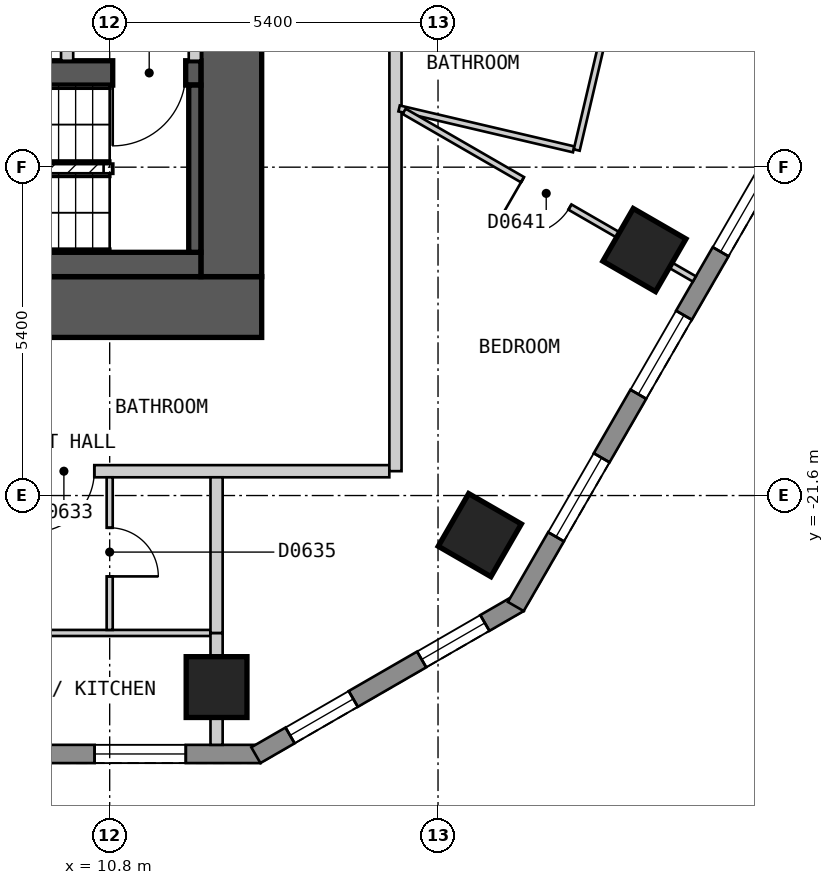
"""IFC4 building model, lengths in metres.
Left out: names, types, materials, properties, quantities, classifications, styles, units other than length and angle.
Written with IfcOpenShell. Run it as: python <this file> out.ifc"""

import sys

from ifc_helpers import new_model, si_unit, direction, frame, frame_2d, origin, origin_2d, place, context, subcontext, project, spatial, polyline, rectangle, outline, extrude, element, fill, save


model = new_model("IFC4")
c1 = context("Model", 3, precision=1e-05, world=origin(), true_north=direction((0.0, 1.0)))
c2 = subcontext(c1, "Body", "Model", "MODEL_VIEW")
j1 = project(units=[si_unit("LENGTHUNIT", "METRE"), si_unit("PLANEANGLEUNIT", "RADIAN")], contexts=[c1])
p1 = place(None, origin())
s1 = spatial("IfcSite", under=j1, at=p1, CompositionType="ELEMENT")
p2 = place(p1, origin())
s2 = spatial("IfcBuilding", under=s1, at=p2, CompositionType="ELEMENT")
p3 = place(p2, frame((0.0, 0.0, 81.0)))
s3 = spatial("IfcBuildingStorey", under=s2, at=p3, CompositionType="ELEMENT", Elevation=81.0)
for number, where, z_axis, x_axis in (
    (1, (12.558, -24.75, 0.0), (0.0, 0.0, 1.0), (1.0, 0.0, 0.0)),
    (2, (16.887, -22.251, 0.0), (0.0, 0.0, 1.0), (0.5, 0.866, 0.0)),
    (3, (19.594, -17.563, 0.0), (0.0, 0.0, 1.0), (0.5, 0.866, 0.0)),
):
    element("IfcColumn", number, at=place(p3, frame(where, z_axis=z_axis, x_axis=x_axis)), inside=s3, PredefinedType="COLUMN", context=c2, shape_type="SweptSolid", body=[
        extrude(rectangle(XDim=1.0, YDim=1.0, at=origin_2d()), origin(), (0.0, 0.0, 1.0), 3.0),
    ])
p4 = place(p3, frame((-13.3, -18.5, 0.0), z_axis=(0.0, 0.0, 1.0), x_axis=(1.0, 0.0, 0.0)))
e4 = element("IfcWall", 4, at=p4, inside=s3, PredefinedType="SHEAR", context=c2, shape_type="SweptSolid", body=[
    extrude(rectangle(XDim=26.6, YDim=1.0, at=frame_2d((13.3, 0.0))), origin(), (0.0, 0.0, 1.0), 2.7),
])
p5 = place(p3, frame((12.8, -18.0, 0.0), z_axis=(0.0, 0.0, 1.0), x_axis=(0.0, 1.0, 0.0)))
e5 = element("IfcWall", 5, at=p5, inside=s3, PredefinedType="SHEAR", context=c2, shape_type="SweptSolid", body=[
    extrude(rectangle(XDim=12.0, YDim=1.0, at=frame_2d((6.0, 0.0))), origin(), (0.0, 0.0, 1.0), 2.7),
])
p6 = place(p3, frame((-12.3, -14.65, 0.0), z_axis=(0.0, 0.0, 1.0), x_axis=(1.0, 0.0, 0.0)))
e6 = element("IfcWall", 6, at=p6, inside=s3, PredefinedType="SHEAR", context=c2, shape_type="SweptSolid", body=[
    extrude(rectangle(XDim=24.6, YDim=0.4, at=frame_2d((12.3, 0.0))), origin(), (0.0, 0.0, 1.0), 2.7),
])
p7 = place(p6, frame((1.5, 0.0, 0.0), z_axis=(0.0, 0.0, 1.0), x_axis=(-1.0, 0.0, 0.0)))
e7 = element("IfcOpeningElement", 7, at=p7, cuts=e6, PredefinedType="OPENING", context=c2, shape_type="SweptSolid", body=[
    extrude(rectangle(XDim=1.2, YDim=2.1, at=frame_2d((0.6, 1.05))), frame((0.0, 0.21, 0.0), z_axis=(0.0, -1.0, 0.0), x_axis=(1.0, 0.0, 0.0)), (0.0, 0.0, 1.0), 0.42),
])
p8 = place(p6, frame((24.35, 0.0, 0.0), z_axis=(0.0, 0.0, 1.0), x_axis=(-1.0, 0.0, 0.0)))
e8 = element("IfcOpeningElement", 8, at=p8, cuts=e6, PredefinedType="OPENING", context=c2, shape_type="SweptSolid", body=[
    extrude(rectangle(XDim=1.2, YDim=2.1, at=frame_2d((0.6, 1.05))), frame((0.0, 0.21, 0.0), z_axis=(0.0, -1.0, 0.0), x_axis=(1.0, 0.0, 0.0)), (0.0, 0.0, 1.0), 0.42),
])
p9 = place(p6, frame((16.45, 0.0, 0.0), z_axis=(0.0, 0.0, 1.0), x_axis=(-1.0, 0.0, 0.0)))
e9 = element("IfcOpeningElement", 9, at=p9, cuts=e6, PredefinedType="OPENING", context=c2, shape_type="SweptSolid", body=[
    extrude(rectangle(XDim=0.9, YDim=2.1, at=frame_2d((0.45, 1.05))), frame((0.0, 0.21, 0.0), z_axis=(0.0, -1.0, 0.0), x_axis=(1.0, 0.0, 0.0)), (0.0, 0.0, 1.0), 0.42),
])
p10 = place(p6, frame((18.25, 0.0, 0.0), z_axis=(0.0, 0.0, 1.0), x_axis=(-1.0, 0.0, 0.0)))
e10 = element("IfcOpeningElement", 10, at=p10, cuts=e6, PredefinedType="OPENING", context=c2, shape_type="SweptSolid", body=[
    extrude(rectangle(XDim=0.9, YDim=2.1, at=frame_2d((0.45, 1.05))), frame((0.0, 0.21, 0.0), z_axis=(0.0, -1.0, 0.0), x_axis=(1.0, 0.0, 0.0)), (0.0, 0.0, 1.0), 0.42),
])
p11 = place(p3, frame((-13.279, -25.85, 0.0), z_axis=(0.0, 0.0, 1.0), x_axis=(1.0, 0.0, 0.0)))
e11 = element("IfcWall", 11, at=p11, inside=s3, PredefinedType="SOLIDWALL", context=c2, shape_type="SweptSolid", body=[
    extrude(outline(polyline([(0.0, -0.15), (26.558, -0.15), (26.478, 0.15), (0.08, 0.15), (0.0, -0.15)])), origin(), (0.0, 0.0, 1.0), 2.7),
])
p12 = place(p11, frame((1.228, 0.0, 0.15)))
e12 = element("IfcOpeningElement", 12, at=p12, cuts=e11, PredefinedType="OPENING", context=c2, shape_type="SweptSolid", body=[
    extrude(rectangle(XDim=1.5, YDim=2.1, at=frame_2d((0.75, 1.05))), frame((0.0, 0.16, 0.0), z_axis=(0.0, -1.0, 0.0), x_axis=(1.0, 0.0, 0.0)), (0.0, 0.0, 1.0), 0.32),
])
p13 = place(p11, frame((3.739, 0.0, 0.15)))
e13 = element("IfcOpeningElement", 13, at=p13, cuts=e11, PredefinedType="OPENING", context=c2, shape_type="SweptSolid", body=[
    extrude(rectangle(XDim=1.5, YDim=2.1, at=frame_2d((0.75, 1.05))), frame((0.0, 0.16, 0.0), z_axis=(0.0, -1.0, 0.0), x_axis=(1.0, 0.0, 0.0)), (0.0, 0.0, 1.0), 0.32),
])
p14 = place(p11, frame((6.251, 0.0, 0.15)))
e14 = element("IfcOpeningElement", 14, at=p14, cuts=e11, PredefinedType="OPENING", context=c2, shape_type="SweptSolid", body=[
    extrude(rectangle(XDim=1.5, YDim=2.1, at=frame_2d((0.75, 1.05))), frame((0.0, 0.16, 0.0), z_axis=(0.0, -1.0, 0.0), x_axis=(1.0, 0.0, 0.0)), (0.0, 0.0, 1.0), 0.32),
])
p15 = place(p11, frame((8.762, 0.0, 0.15)))
e15 = element("IfcOpeningElement", 15, at=p15, cuts=e11, PredefinedType="OPENING", context=c2, shape_type="SweptSolid", body=[
    extrude(rectangle(XDim=1.5, YDim=2.1, at=frame_2d((0.75, 1.05))), frame((0.0, 0.16, 0.0), z_axis=(0.0, -1.0, 0.0), x_axis=(1.0, 0.0, 0.0)), (0.0, 0.0, 1.0), 0.32),
])
p16 = place(p11, frame((11.274, 0.0, 0.15)))
e16 = element("IfcOpeningElement", 16, at=p16, cuts=e11, PredefinedType="OPENING", context=c2, shape_type="SweptSolid", body=[
    extrude(rectangle(XDim=1.5, YDim=2.1, at=frame_2d((0.75, 1.05))), frame((0.0, 0.16, 0.0), z_axis=(0.0, -1.0, 0.0), x_axis=(1.0, 0.0, 0.0)), (0.0, 0.0, 1.0), 0.32),
])
p17 = place(p11, frame((13.785, 0.0, 0.15)))
e17 = element("IfcOpeningElement", 17, at=p17, cuts=e11, PredefinedType="OPENING", context=c2, shape_type="SweptSolid", body=[
    extrude(rectangle(XDim=1.5, YDim=2.1, at=frame_2d((0.75, 1.05))), frame((0.0, 0.16, 0.0), z_axis=(0.0, -1.0, 0.0), x_axis=(1.0, 0.0, 0.0)), (0.0, 0.0, 1.0), 0.32),
])
p18 = place(p11, frame((16.297, 0.0, 0.15)))
e18 = element("IfcOpeningElement", 18, at=p18, cuts=e11, PredefinedType="OPENING", context=c2, shape_type="SweptSolid", body=[
    extrude(rectangle(XDim=1.5, YDim=2.1, at=frame_2d((0.75, 1.05))), frame((0.0, 0.16, 0.0), z_axis=(0.0, -1.0, 0.0), x_axis=(1.0, 0.0, 0.0)), (0.0, 0.0, 1.0), 0.32),
])
p19 = place(p11, frame((18.808, 0.0, 0.15)))
e19 = element("IfcOpeningElement", 19, at=p19, cuts=e11, PredefinedType="OPENING", context=c2, shape_type="SweptSolid", body=[
    extrude(rectangle(XDim=1.5, YDim=2.1, at=frame_2d((0.75, 1.05))), frame((0.0, 0.16, 0.0), z_axis=(0.0, -1.0, 0.0), x_axis=(1.0, 0.0, 0.0)), (0.0, 0.0, 1.0), 0.32),
])
p20 = place(p11, frame((21.32, 0.0, 0.15)))
e20 = element("IfcOpeningElement", 20, at=p20, cuts=e11, PredefinedType="OPENING", context=c2, shape_type="SweptSolid", body=[
    extrude(rectangle(XDim=1.5, YDim=2.1, at=frame_2d((0.75, 1.05))), frame((0.0, 0.16, 0.0), z_axis=(0.0, -1.0, 0.0), x_axis=(1.0, 0.0, 0.0)), (0.0, 0.0, 1.0), 0.32),
])
p21 = place(p11, frame((23.831, 0.0, 0.15)))
e21 = element("IfcOpeningElement", 21, at=p21, cuts=e11, PredefinedType="OPENING", context=c2, shape_type="SweptSolid", body=[
    extrude(rectangle(XDim=1.5, YDim=2.1, at=frame_2d((0.75, 1.05))), frame((0.0, 0.16, 0.0), z_axis=(0.0, -1.0, 0.0), x_axis=(1.0, 0.0, 0.0)), (0.0, 0.0, 1.0), 0.32),
])
p22 = place(p3, frame((13.204, -25.87, 0.0), z_axis=(0.0, 0.0, 1.0), x_axis=(0.866010750942, 0.50002537861, 0.0)))
e22 = element("IfcWall", 22, at=p22, inside=s3, PredefinedType="SOLIDWALL", context=c2, shape_type="SweptSolid", body=[
    extrude(outline(polyline([(0.0, -0.15), (5.0, -0.15), (4.919, 0.15), (0.08, 0.15), (0.0, -0.15)])), origin(), (0.0, 0.0, 1.0), 2.7),
])
p23 = place(p22, frame((0.65, 0.0, 0.15)))
e23 = element("IfcOpeningElement", 23, at=p23, cuts=e22, PredefinedType="OPENING", context=c2, shape_type="SweptSolid", body=[
    extrude(rectangle(XDim=1.2, YDim=2.1, at=frame_2d((0.6, 1.05))), frame((0.0, 0.16, 0.0), z_axis=(0.0, -1.0, 0.0), x_axis=(1.0, 0.0, 0.0)), (0.0, 0.0, 1.0), 0.32),
])
p24 = place(p22, frame((3.149, 0.0, 0.15)))
e24 = element("IfcOpeningElement", 24, at=p24, cuts=e22, PredefinedType="OPENING", context=c2, shape_type="SweptSolid", body=[
    extrude(rectangle(XDim=1.2, YDim=2.1, at=frame_2d((0.6, 1.05))), frame((0.0, 0.16, 0.0), z_axis=(0.0, -1.0, 0.0), x_axis=(1.0, 0.0, 0.0)), (0.0, 0.0, 1.0), 0.32),
])
p25 = place(p3, frame((17.479, -23.425, 0.0), z_axis=(0.0, 0.0, 1.0), x_axis=(0.500035407905, 0.866004960056, 0.0)))
e25 = element("IfcWall", 25, at=p25, inside=s3, PredefinedType="SOLIDWALL", context=c2, shape_type="SweptSolid", body=[
    extrude(outline(polyline([(0.0, -0.15), (23.094, -0.15), (23.014, 0.15), (0.08, 0.15), (0.0, -0.15)])), origin(), (0.0, 0.0, 1.0), 2.7),
])
p26 = place(p25, frame((1.324, 0.0, 0.15)))
e26 = element("IfcOpeningElement", 26, at=p26, cuts=e25, PredefinedType="OPENING", context=c2, shape_type="SweptSolid", body=[
    extrude(rectangle(XDim=1.5, YDim=2.1, at=frame_2d((0.75, 1.05))), frame((0.0, 0.16, 0.0), z_axis=(0.0, -1.0, 0.0), x_axis=(1.0, 0.0, 0.0)), (0.0, 0.0, 1.0), 0.32),
])
p27 = place(p25, frame((4.031, 0.0, 0.15)))
e27 = element("IfcOpeningElement", 27, at=p27, cuts=e25, PredefinedType="OPENING", context=c2, shape_type="SweptSolid", body=[
    extrude(rectangle(XDim=1.5, YDim=2.1, at=frame_2d((0.75, 1.05))), frame((0.0, 0.16, 0.0), z_axis=(0.0, -1.0, 0.0), x_axis=(1.0, 0.0, 0.0)), (0.0, 0.0, 1.0), 0.32),
])
p28 = place(p25, frame((6.737, 0.0, 0.15)))
e28 = element("IfcOpeningElement", 28, at=p28, cuts=e25, PredefinedType="OPENING", context=c2, shape_type="SweptSolid", body=[
    extrude(rectangle(XDim=1.5, YDim=2.1, at=frame_2d((0.75, 1.05))), frame((0.0, 0.16, 0.0), z_axis=(0.0, -1.0, 0.0), x_axis=(1.0, 0.0, 0.0)), (0.0, 0.0, 1.0), 0.32),
])
p29 = place(p25, frame((9.444, 0.0, 0.15)))
e29 = element("IfcOpeningElement", 29, at=p29, cuts=e25, PredefinedType="OPENING", context=c2, shape_type="SweptSolid", body=[
    extrude(rectangle(XDim=1.5, YDim=2.1, at=frame_2d((0.75, 1.05))), frame((0.0, 0.16, 0.0), z_axis=(0.0, -1.0, 0.0), x_axis=(1.0, 0.0, 0.0)), (0.0, 0.0, 1.0), 0.32),
])
p30 = place(p25, frame((12.151, 0.0, 0.15)))
e30 = element("IfcOpeningElement", 30, at=p30, cuts=e25, PredefinedType="OPENING", context=c2, shape_type="SweptSolid", body=[
    extrude(rectangle(XDim=1.5, YDim=2.1, at=frame_2d((0.75, 1.05))), frame((0.0, 0.16, 0.0), z_axis=(0.0, -1.0, 0.0), x_axis=(1.0, 0.0, 0.0)), (0.0, 0.0, 1.0), 0.32),
])
p31 = place(p25, frame((14.857, 0.0, 0.15)))
e31 = element("IfcOpeningElement", 31, at=p31, cuts=e25, PredefinedType="OPENING", context=c2, shape_type="SweptSolid", body=[
    extrude(rectangle(XDim=1.5, YDim=2.1, at=frame_2d((0.75, 1.05))), frame((0.0, 0.16, 0.0), z_axis=(0.0, -1.0, 0.0), x_axis=(1.0, 0.0, 0.0)), (0.0, 0.0, 1.0), 0.32),
])
p32 = place(p25, frame((17.564, 0.0, 0.15)))
e32 = element("IfcOpeningElement", 32, at=p32, cuts=e25, PredefinedType="OPENING", context=c2, shape_type="SweptSolid", body=[
    extrude(rectangle(XDim=1.5, YDim=2.1, at=frame_2d((0.75, 1.05))), frame((0.0, 0.16, 0.0), z_axis=(0.0, -1.0, 0.0), x_axis=(1.0, 0.0, 0.0)), (0.0, 0.0, 1.0), 0.32),
])
p33 = place(p25, frame((20.271, 0.0, 0.15)))
e33 = element("IfcOpeningElement", 33, at=p33, cuts=e25, PredefinedType="OPENING", context=c2, shape_type="SweptSolid", body=[
    extrude(rectangle(XDim=1.5, YDim=2.1, at=frame_2d((0.75, 1.05))), frame((0.0, 0.16, 0.0), z_axis=(0.0, -1.0, 0.0), x_axis=(1.0, 0.0, 0.0)), (0.0, 0.0, 1.0), 0.32),
])
p34 = place(p3, frame((-15.499, -21.2, 0.0), z_axis=(0.0, 0.0, 1.0), x_axis=(1.0, 0.0, 0.0)))
e34 = element("IfcWall", 34, at=p34, inside=s3, PredefinedType="PARTITIONING", context=c2, shape_type="SweptSolid", body=[
    extrude(rectangle(XDim=30.898, YDim=0.2, at=frame_2d((15.449, 0.0))), origin(), (0.0, 0.0, 1.0), 2.7),
])
p35 = place(p34, frame((4.954, 0.0, 0.0)))
e35 = element("IfcOpeningElement", 35, at=p35, cuts=e34, PredefinedType="OPENING", context=c2, shape_type="SweptSolid", body=[
    extrude(rectangle(XDim=1.0, YDim=2.1, at=frame_2d((0.5, 1.05))), frame((0.0, 0.11, 0.0), z_axis=(0.0, -1.0, 0.0), x_axis=(1.0, 0.0, 0.0)), (0.0, 0.0, 1.0), 0.22),
])
p36 = place(p34, frame((25.046, 0.0, 0.0)))
e36 = element("IfcOpeningElement", 36, at=p36, cuts=e34, PredefinedType="OPENING", context=c2, shape_type="SweptSolid", body=[
    extrude(rectangle(XDim=1.0, YDim=2.1, at=frame_2d((0.5, 1.05))), frame((0.0, 0.11, 0.0), z_axis=(0.0, -1.0, 0.0), x_axis=(1.0, 0.0, 0.0)), (0.0, 0.0, 1.0), 0.22),
])
p37 = place(p3, frame((15.5, -21.199, 0.0), z_axis=(0.0, 0.0, 1.0), x_axis=(0.0, 1.0, 0.0)))
e37 = element("IfcWall", 37, at=p37, inside=s3, PredefinedType="PARTITIONING", context=c2, shape_type="SweptSolid", body=[
    extrude(rectangle(XDim=10.483, YDim=0.2, at=frame_2d((5.241, 0.0))), origin(), (0.0, 0.0, 1.0), 2.7),
])
p38 = place(p37, frame((8.376, 0.0, 0.0)))
e38 = element("IfcOpeningElement", 38, at=p38, cuts=e37, PredefinedType="OPENING", context=c2, shape_type="SweptSolid", body=[
    extrude(rectangle(XDim=1.0, YDim=2.1, at=frame_2d((0.5, 1.05))), frame((0.0, 0.11, 0.0), z_axis=(0.0, -1.0, 0.0), x_axis=(1.0, 0.0, 0.0)), (0.0, 0.0, 1.0), 0.22),
])
p39 = place(p3, frame((15.56, -15.234, 0.0), z_axis=(0.0, 0.0, 1.0), x_axis=(0.973598200068, -0.228268580457, 0.0)))
e39 = element("IfcWall", 39, at=p39, inside=s3, PredefinedType="PARTITIONING", context=c2, shape_type="SweptSolid", body=[
    extrude(rectangle(XDim=2.949, YDim=0.1, at=frame_2d((1.474, 0.0))), origin(), (0.0, 0.0, 1.0), 2.7),
])
p40 = place(p3, frame((15.643, -15.282, 0.0), z_axis=(0.0, 0.0, 1.0), x_axis=(0.865990833325, -0.500059873013, 0.0)))
e40 = element("IfcWall", 40, at=p40, inside=s3, PredefinedType="PARTITIONING", context=c2, shape_type="SweptSolid", body=[
    extrude(rectangle(XDim=5.511, YDim=0.1, at=frame_2d((2.756, 0.0))), origin(), (0.0, 0.0, 1.0), 2.7),
])
p41 = place(p40, frame((2.248, 0.0, 0.0)))
e41 = element("IfcOpeningElement", 41, at=p41, cuts=e40, PredefinedType="OPENING", context=c2, shape_type="SweptSolid", body=[
    extrude(rectangle(XDim=0.9, YDim=2.1, at=frame_2d((0.45, 1.05))), frame((0.0, 0.06, 0.0), z_axis=(0.0, -1.0, 0.0), x_axis=(1.0, 0.0, 0.0)), (0.0, 0.0, 1.0), 0.12),
])
p42 = place(p3, frame((9.294, -23.86, 0.0), z_axis=(0.0, 0.0, 1.0), x_axis=(1.0, 0.0, 0.0)))
e42 = element("IfcWall", 42, at=p42, inside=s3, PredefinedType="PARTITIONING", context=c2, shape_type="SweptSolid", body=[
    extrude(rectangle(XDim=3.164, YDim=0.1, at=frame_2d((1.582, 0.0))), origin(), (0.0, 0.0, 1.0), 2.7),
])
p43 = place(p3, frame((18.481, -15.918, 0.0), z_axis=(0.0, 0.0, 1.0), x_axis=(0.228391116115, 0.97356946238, 0.0)))
e43 = element("IfcWall", 43, at=p43, inside=s3, PredefinedType="PARTITIONING", context=c2, shape_type="SweptSolid", body=[
    extrude(rectangle(XDim=3.674, YDim=0.1, at=frame_2d((1.837, 0.0))), origin(), (0.0, 0.0, 1.0), 2.7),
])
p44 = place(p3, frame((10.8, -23.81, 0.0), z_axis=(0.0, 0.0, 1.0), x_axis=(0.0, 1.0, 0.0)))
e44 = element("IfcWall", 44, at=p44, inside=s3, PredefinedType="PARTITIONING", context=c2, shape_type="SweptSolid", body=[
    extrude(rectangle(XDim=2.51, YDim=0.1, at=frame_2d((1.255, 0.0))), origin(), (0.0, 0.0, 1.0), 2.7),
])
p45 = place(p44, frame((0.88, 0.0, 0.0)))
e45 = element("IfcOpeningElement", 45, at=p45, cuts=e44, PredefinedType="OPENING", context=c2, shape_type="SweptSolid", body=[
    extrude(rectangle(XDim=0.8, YDim=2.1, at=frame_2d((0.4, 1.05))), frame((0.0, 0.06, 0.0), z_axis=(0.0, -1.0, 0.0), x_axis=(1.0, 0.0, 0.0)), (0.0, 0.0, 1.0), 0.12),
])
p46 = place(p3, frame((12.558, -23.86, 0.0), z_axis=(0.0, 0.0, 1.0), x_axis=(0.0, -1.0, 0.0)))
e46 = element("IfcWall", 46, at=p46, inside=s3, PredefinedType="PARTITIONING", context=c2, shape_type="SweptSolid", body=[
    extrude(rectangle(XDim=1.84, YDim=0.2, at=frame_2d((0.92, 0.0))), origin(), (0.0, 0.0, 1.0), 2.7),
])
p47 = place(p3, frame((12.558, -23.86, 0.0), z_axis=(0.0, 0.0, 1.0), x_axis=(0.0, 1.0, 0.0)))
e47 = element("IfcWall", 47, at=p47, inside=s3, PredefinedType="PARTITIONING", context=c2, shape_type="SweptSolid", body=[
    extrude(rectangle(XDim=2.56, YDim=0.2, at=frame_2d((1.28, 0.0))), origin(), (0.0, 0.0, 1.0), 2.7),
])
p48 = place(p3, frame((6.7, -17.8, 0.0), z_axis=(0.0, 0.0, 1.0), x_axis=(1.0, 0.0, 0.0)))
e48 = element("IfcWall", 48, at=p48, inside=s3, PredefinedType="SOLIDWALL", context=c2, shape_type="SweptSolid", body=[
    extrude(rectangle(XDim=5.6, YDim=0.4, at=frame_2d((2.8, 0.0))), origin(), (0.0, 0.0, 1.0), 2.7),
])
p49 = place(p3, frame((10.1, -14.45, 0.0), z_axis=(0.0, 0.0, 1.0), x_axis=(0.0, 1.0, 0.0)))
e49 = element("IfcWall", 49, at=p49, inside=s3, PredefinedType="PARTITIONING", context=c2, shape_type="SweptSolid", body=[
    extrude(rectangle(XDim=1.8, YDim=0.2, at=frame_2d((0.9, 0.0))), origin(), (0.0, 0.0, 1.0), 2.7),
])
p50 = place(p3, frame((12.2, -17.6, 0.0), z_axis=(0.0, 0.0, 1.0), x_axis=(0.0, 1.0, 0.0)))
e50 = element("IfcWall", 50, at=p50, inside=s3, PredefinedType="SOLIDWALL", context=c2, shape_type="SweptSolid", body=[
    extrude(rectangle(XDim=2.75, YDim=0.2, at=frame_2d((1.375, 0.0))), origin(), (0.0, 0.0, 1.0), 2.7),
])
p51 = place(p3, frame((12.2, -14.45, 0.0), z_axis=(0.0, 0.0, 1.0), x_axis=(0.0, 1.0, 0.0)))
e51 = element("IfcWall", 51, at=p51, inside=s3, PredefinedType="PARTITIONING", context=c2, shape_type="SweptSolid", body=[
    extrude(rectangle(XDim=8.25, YDim=0.2, at=frame_2d((4.125, 0.0))), origin(), (0.0, 0.0, 1.0), 2.7),
])
p52 = place(p21, origin())
e52 = element("IfcWindow", 52, at=p52, inside=s3, PartitioningType="SINGLE_PANEL", PredefinedType="WINDOW", context=c2, shape_type="SweptSolid", body=[
    extrude(rectangle(XDim=1.5, YDim=2.1, at=frame_2d((0.75, 1.05))), frame((0.0, 0.03, 0.0), z_axis=(0.0, -1.0, 0.0), x_axis=(1.0, 0.0, 0.0)), (0.0, 0.0, 1.0), 0.06),
])
fill(e21, e52)
p53 = place(p23, origin())
e53 = element("IfcWindow", 53, at=p53, inside=s3, PartitioningType="SINGLE_PANEL", PredefinedType="WINDOW", context=c2, shape_type="SweptSolid", body=[
    extrude(rectangle(XDim=1.2, YDim=2.1, at=frame_2d((0.6, 1.05))), frame((0.0, 0.03, 0.0), z_axis=(0.0, -1.0, 0.0), x_axis=(1.0, 0.0, 0.0)), (0.0, 0.0, 1.0), 0.06),
])
fill(e23, e53)
p54 = place(p24, origin())
e54 = element("IfcWindow", 54, at=p54, inside=s3, PartitioningType="SINGLE_PANEL", PredefinedType="WINDOW", context=c2, shape_type="SweptSolid", body=[
    extrude(rectangle(XDim=1.2, YDim=2.1, at=frame_2d((0.6, 1.05))), frame((0.0, 0.03, 0.0), z_axis=(0.0, -1.0, 0.0), x_axis=(1.0, 0.0, 0.0)), (0.0, 0.0, 1.0), 0.06),
])
fill(e24, e54)
p55 = place(p26, origin())
e55 = element("IfcWindow", 55, at=p55, inside=s3, PartitioningType="SINGLE_PANEL", PredefinedType="WINDOW", context=c2, shape_type="SweptSolid", body=[
    extrude(rectangle(XDim=1.5, YDim=2.1, at=frame_2d((0.75, 1.05))), frame((0.0, 0.03, 0.0), z_axis=(0.0, -1.0, 0.0), x_axis=(1.0, 0.0, 0.0)), (0.0, 0.0, 1.0), 0.06),
])
fill(e26, e55)
p56 = place(p27, origin())
e56 = element("IfcWindow", 56, at=p56, inside=s3, PartitioningType="SINGLE_PANEL", PredefinedType="WINDOW", context=c2, shape_type="SweptSolid", body=[
    extrude(rectangle(XDim=1.5, YDim=2.1, at=frame_2d((0.75, 1.05))), frame((0.0, 0.03, 0.0), z_axis=(0.0, -1.0, 0.0), x_axis=(1.0, 0.0, 0.0)), (0.0, 0.0, 1.0), 0.06),
])
fill(e27, e56)
p57 = place(p28, origin())
e57 = element("IfcWindow", 57, at=p57, inside=s3, PartitioningType="SINGLE_PANEL", PredefinedType="WINDOW", context=c2, shape_type="SweptSolid", body=[
    extrude(rectangle(XDim=1.5, YDim=2.1, at=frame_2d((0.75, 1.05))), frame((0.0, 0.03, 0.0), z_axis=(0.0, -1.0, 0.0), x_axis=(1.0, 0.0, 0.0)), (0.0, 0.0, 1.0), 0.06),
])
fill(e28, e57)
p58 = place(p36, origin())
e58 = element("IfcDoor", 58, at=p58, inside=s3, OperationType="SINGLE_SWING_LEFT", PredefinedType="DOOR", context=c2, shape_type="SweptSolid", body=[
    extrude(rectangle(XDim=1.0, YDim=2.1, at=frame_2d((0.5, 1.05))), frame((0.0, 0.025, 0.0), z_axis=(0.0, -1.0, 0.0), x_axis=(1.0, 0.0, 0.0)), (0.0, 0.0, 1.0), 0.05),
])
fill(e36, e58)
p59 = place(p45, origin())
e59 = element("IfcDoor", 59, at=p59, inside=s3, OperationType="SINGLE_SWING_LEFT", PredefinedType="DOOR", context=c2, shape_type="SweptSolid", body=[
    extrude(rectangle(XDim=0.8, YDim=2.1, at=frame_2d((0.4, 1.05))), frame((0.0, 0.025, 0.0), z_axis=(0.0, -1.0, 0.0), x_axis=(1.0, 0.0, 0.0)), (0.0, 0.0, 1.0), 0.05),
])
fill(e45, e59)
p60 = place(p41, origin())
e60 = element("IfcDoor", 60, at=p60, inside=s3, OperationType="SINGLE_SWING_LEFT", PredefinedType="DOOR", context=c2, shape_type="SweptSolid", body=[
    extrude(rectangle(XDim=0.9, YDim=2.1, at=frame_2d((0.45, 1.05))), frame((0.0, 0.025, 0.0), z_axis=(0.0, -1.0, 0.0), x_axis=(1.0, 0.0, 0.0)), (0.0, 0.0, 1.0), 0.05),
])
fill(e41, e60)
p61 = place(p8, origin())
e61 = element("IfcDoor", 61, at=p61, inside=s3, OperationType="SINGLE_SWING_RIGHT", PredefinedType="DOOR", context=c2, shape_type="SweptSolid", body=[
    extrude(rectangle(XDim=1.2, YDim=2.1, at=frame_2d((0.6, 1.05))), frame((0.0, 0.025, 0.0), z_axis=(0.0, -1.0, 0.0), x_axis=(1.0, 0.0, 0.0)), (0.0, 0.0, 1.0), 0.05),
])
fill(e8, e61)
save(model, sys.argv[1])
